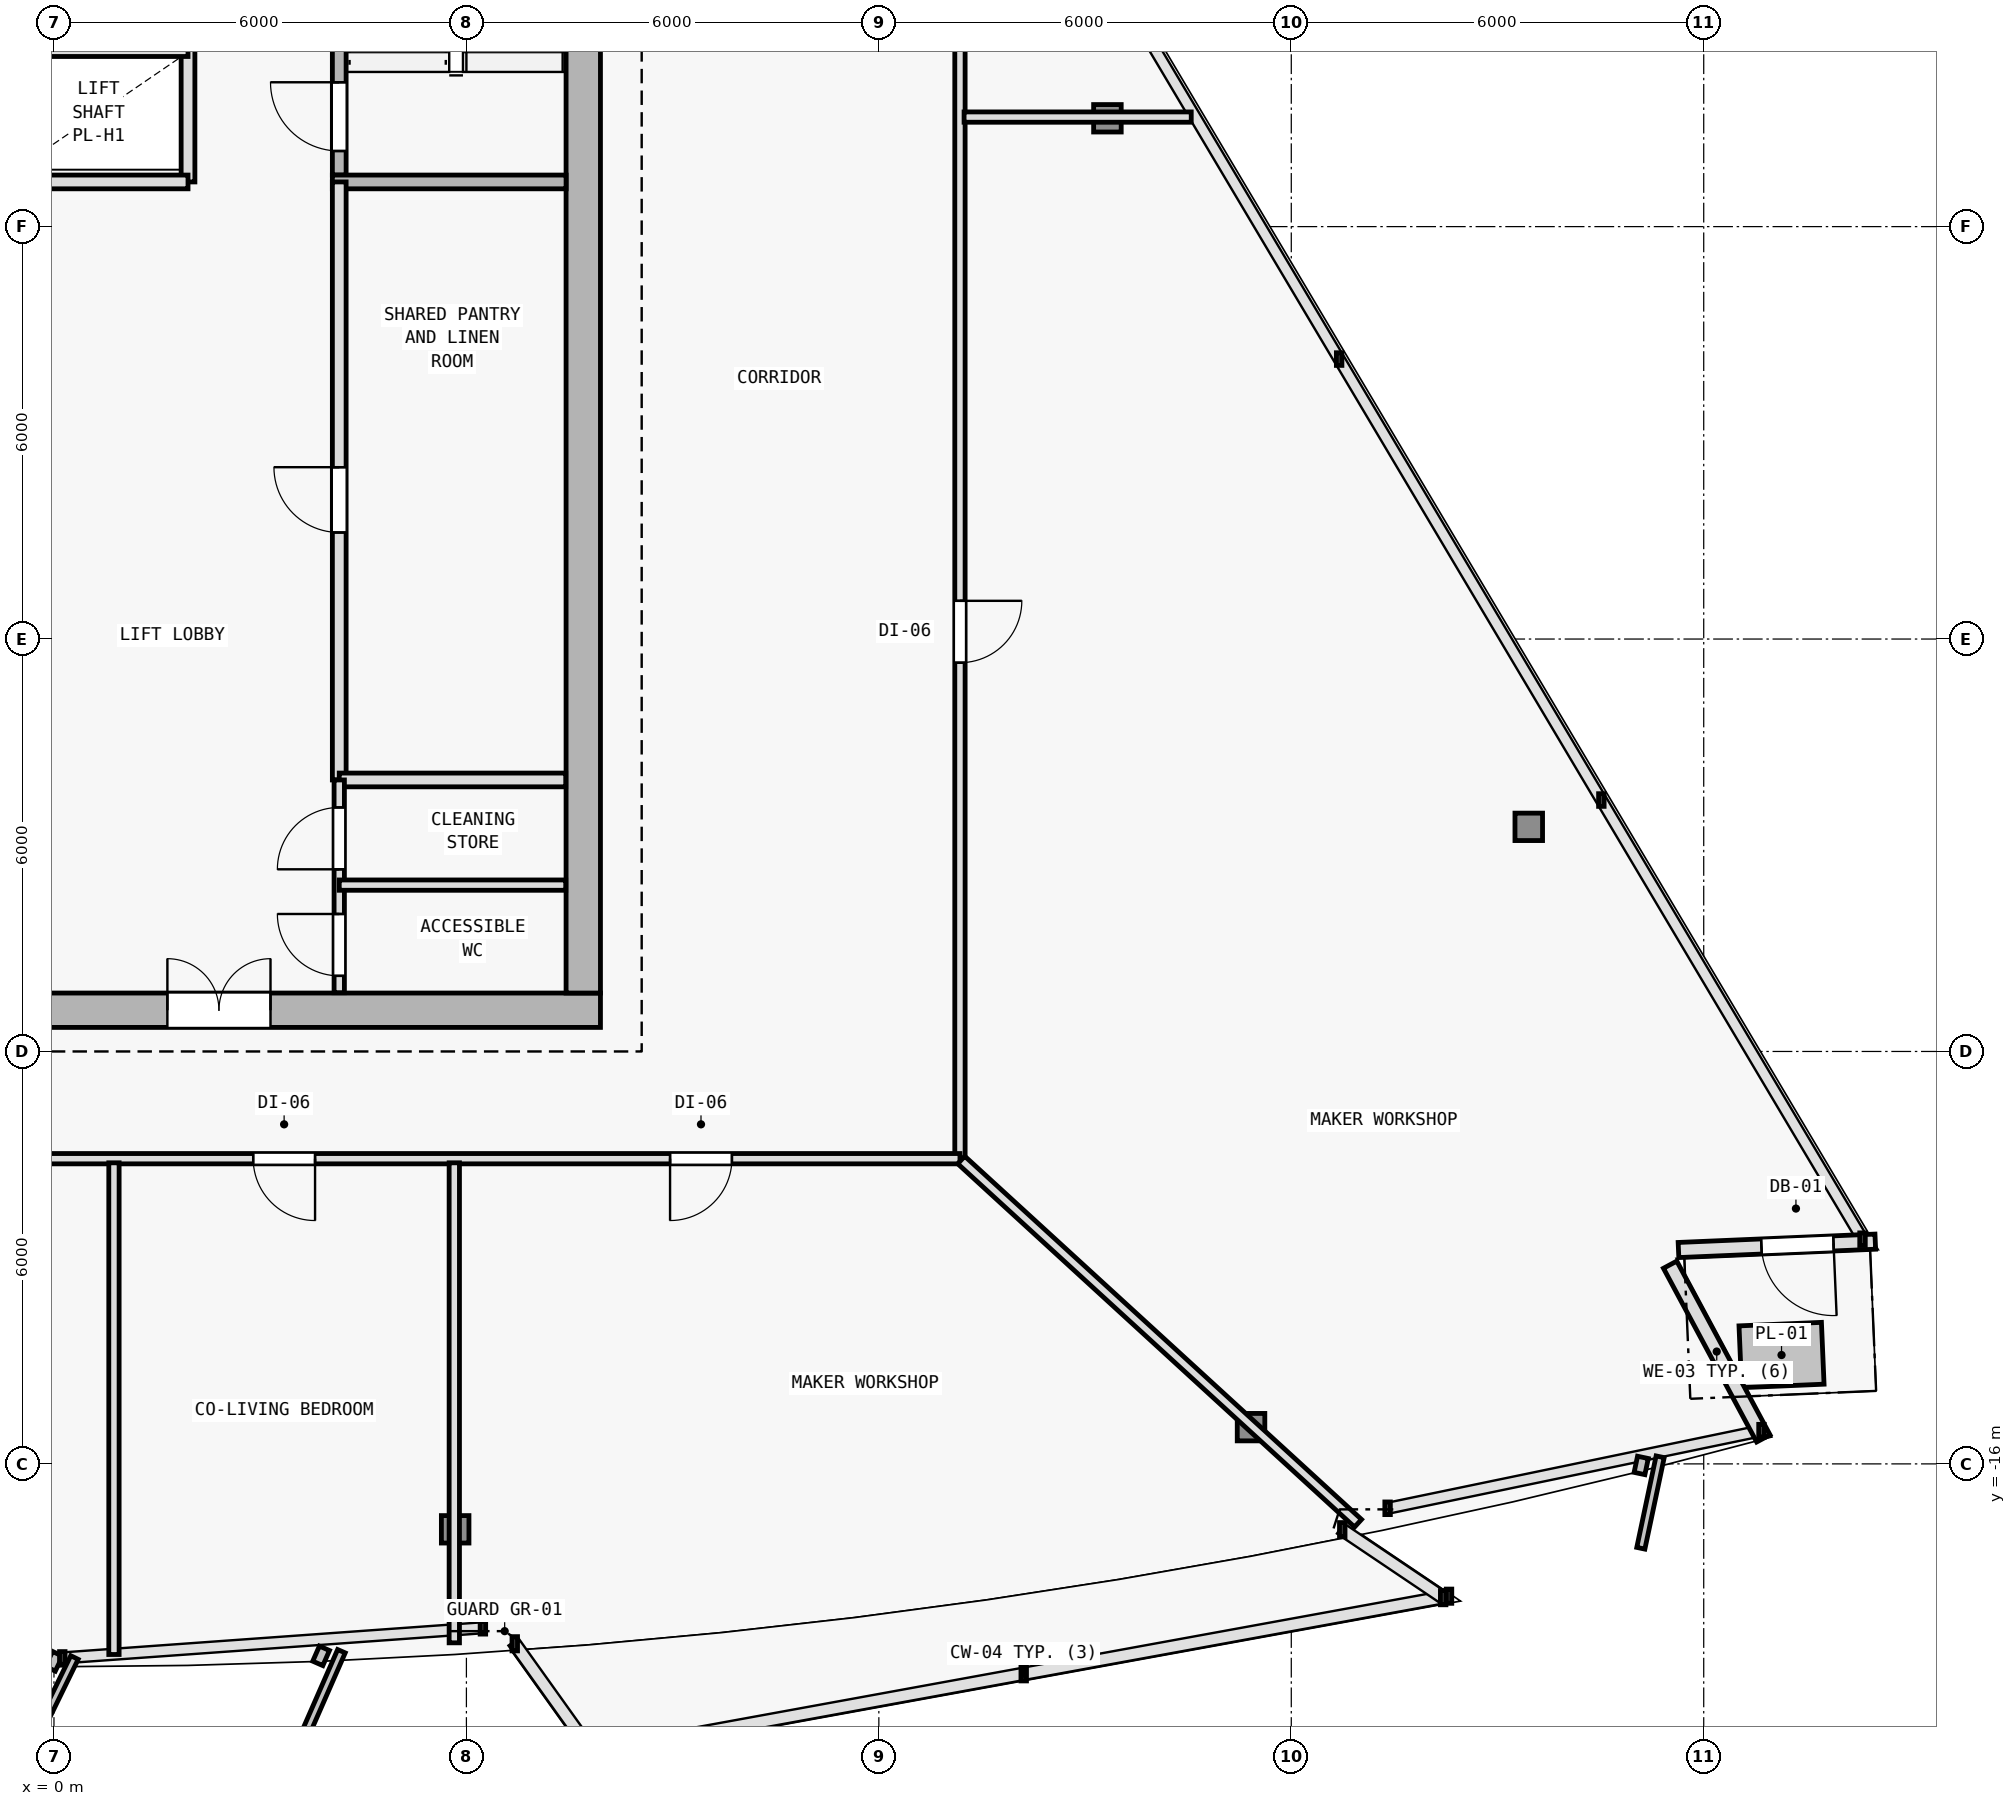
"""IFC4 building model, lengths in metres.
Left out: names, types, materials, properties, quantities, classifications, styles, units other than length and angle.
Written with IfcOpenShell. Run it as: python <this file> out.ifc"""

import sys

from ifc_helpers import new_model, si_unit, direction, frame, frame_2d, origin, origin_2d, place, context, subcontext, project, spatial, rectangle, i_section, extrude, element, fill, save


model = new_model("IFC4")
c1 = context("Model", 3, precision=1e-05, world=origin(), true_north=direction((0.0, 1.0)))
c2 = subcontext(c1, "Body", "Model", "MODEL_VIEW")
j1 = project(units=[si_unit("LENGTHUNIT", "METRE"), si_unit("PLANEANGLEUNIT", "RADIAN")], contexts=[c1])
p1 = place(None, origin())
s1 = spatial("IfcSite", under=j1, at=p1, CompositionType="ELEMENT")
p2 = place(p1, origin())
s2 = spatial("IfcBuilding", under=s1, at=p2, CompositionType="ELEMENT")
p3 = place(p2, frame((0.0, 0.0, 174.6)))
s3 = spatial("IfcBuildingStorey", under=s2, at=p3, CompositionType="ELEMENT", Elevation=174.6)
for number, where, z_axis, x_axis in (
    (1, (7.7, -9.4, 0.0), (0.0, 0.0, 1.0), (1.0, 0.0, 0.0)),
    (2, (0.0, -9.4, 0.0), (0.0, 0.0, 1.0), (1.0, 0.0, 0.0)),
    (3, (7.7, 0.4, 0.0), (0.0, 0.0, 1.0), (1.0, 0.0, 0.0)),
):
    element("IfcColumn", number, at=place(p3, frame(where, z_axis=z_axis, x_axis=x_axis)), inside=s3, PredefinedType="COLUMN", context=c2, shape_type="SweptSolid", body=[
        extrude(i_section(OverallWidth=0.404, OverallDepth=0.407, WebThickness=0.017, FlangeThickness=0.028, FilletRadius=0.015, at=origin_2d()), origin(), (0.0, 0.0, 1.0), 3.6),
    ])
p4 = place(p3, frame((5.836, -16.952, 0.005), z_axis=(-0.007069526978, 0.036231325765, 0.999318424138), x_axis=(-0.981490592026, -0.19151035942, 0.0)))
e4 = element("IfcColumn", 4, at=p4, inside=s3, PredefinedType="COLUMN", context=c2, shape_type="SweptSolid", body=[
    extrude(i_section(OverallWidth=0.401, OverallDepth=0.399, WebThickness=0.016, FlangeThickness=0.025, FilletRadius=0.015, at=origin_2d()), origin(), (0.0, 0.0, 1.0), 3.592),
])
p5 = place(p3, frame((17.415, -15.465, 0.005), z_axis=(-0.021205716244, 0.034391321857, 0.999183443908), x_axis=(-0.851195920716, -0.524848077596, 0.0)))
e5 = element("IfcColumn", 5, at=p5, inside=s3, PredefinedType="COLUMN", context=c2, shape_type="SweptSolid", body=[
    extrude(i_section(OverallWidth=0.401, OverallDepth=0.399, WebThickness=0.016, FlangeThickness=0.025, FilletRadius=0.015, at=origin_2d()), origin(), (0.0, 0.0, 1.0), 3.592),
])
p6 = place(p3, frame((21.455, -6.732, 0.005), z_axis=(-0.026784657173, 0.022229905827, 0.99939402311), x_axis=(-0.638646294968, -0.7695004288, 0.0)))
e6 = element("IfcColumn", 6, at=p6, inside=s3, PredefinedType="COLUMN", context=c2, shape_type="SweptSolid", body=[
    extrude(i_section(OverallWidth=0.401, OverallDepth=0.399, WebThickness=0.016, FlangeThickness=0.025, FilletRadius=0.015, at=origin_2d()), origin(), (0.0, 0.0, 1.0), 3.591),
])
p7 = place(p3, frame((15.325, 3.576, 0.005), z_axis=(-0.019449845701, 0.009792929304, 0.999762872904), x_axis=(-0.449710241045, -0.893174506521, 0.0)))
e7 = element("IfcColumn", 7, at=p7, inside=s3, PredefinedType="COLUMN", context=c2, shape_type="SweptSolid", body=[
    extrude(i_section(OverallWidth=0.401, OverallDepth=0.399, WebThickness=0.016, FlangeThickness=0.025, FilletRadius=0.015, at=origin_2d()), origin(), (0.0, 0.0, 1.0), 3.59),
])
p8 = place(p3, frame((23.511, -13.102, 0.0), z_axis=(0.0, 0.0, 1.0), x_axis=(0.472804807667, -0.881167188362, 0.0)))
e8 = element("IfcWall", 8, at=p8, inside=s3, PredefinedType="SOLIDWALL", context=c2, shape_type="SweptSolid", body=[
    extrude(rectangle(XDim=2.868, YDim=0.22, at=frame_2d((1.434, 0.0))), origin(), (0.0, 0.0, 1.0), 3.35),
])
p9 = place(p3, frame((26.496, -12.767, 0.0), z_axis=(0.0, 0.0, 1.0), x_axis=(-0.999095763679, -0.042516526188, 0.0)))
e9 = element("IfcWall", 9, at=p9, inside=s3, PredefinedType="SOLIDWALL", context=c2, shape_type="SweptSolid", body=[
    extrude(rectangle(XDim=2.865, YDim=0.22, at=frame_2d((1.433, 0.0))), origin(), (0.0, 0.0, 1.0), 3.35),
])
p10 = place(p9, frame((0.608, 0.0, 0.0)))
e10 = element("IfcOpeningElement", 10, at=p10, cuts=e9, PredefinedType="OPENING", context=c2, shape_type="SweptSolid", body=[
    extrude(rectangle(XDim=1.05, YDim=2.15, at=frame_2d((0.525, 1.075))), frame((0.0, 0.12, 0.0), z_axis=(0.0, -1.0, 0.0), x_axis=(1.0, 0.0, 0.0)), (0.0, 0.0, 1.0), 0.24),
])
p11 = place(p3, frame((-7.95, -9.4, 0.0), z_axis=(0.0, 0.0, 1.0), x_axis=(1.0, 0.0, 0.0)))
e11 = element("IfcWall", 11, at=p11, inside=s3, PredefinedType="SHEAR", context=c2, shape_type="SweptSolid", body=[
    extrude(rectangle(XDim=15.9, YDim=0.5, at=frame_2d((7.95, 0.0))), origin(), (0.0, 0.0, 1.0), 3.35),
])
p12 = place(p11, frame((9.6, 0.0, 0.0)))
e12 = element("IfcOpeningElement", 12, at=p12, cuts=e11, PredefinedType="OPENING", context=c2, shape_type="SweptSolid", body=[
    extrude(rectangle(XDim=1.5, YDim=2.2, at=frame_2d((0.75, 1.1))), frame((0.0, 0.26, 0.0), z_axis=(0.0, -1.0, 0.0), x_axis=(1.0, 0.0, 0.0)), (0.0, 0.0, 1.0), 0.52),
])
p13 = place(p3, frame((7.7, 9.95, 0.0), z_axis=(0.0, 0.0, 1.0), x_axis=(0.0, -1.0, 0.0)))
e13 = element("IfcWall", 13, at=p13, inside=s3, PredefinedType="SHEAR", context=c2, shape_type="SweptSolid", body=[
    extrude(rectangle(XDim=19.1, YDim=0.5, at=frame_2d((9.55, 0.0))), origin(), (0.0, 0.0, 1.0), 3.35),
])
p14 = place(p3, frame((4.15, 2.75, 0.0), z_axis=(0.0, 0.0, 1.0), x_axis=(0.0, 1.0, 0.0)))
e14 = element("IfcWall", 14, at=p14, inside=s3, PredefinedType="SOLIDWALL", context=c2, shape_type="SweptSolid", body=[
    extrude(rectangle(XDim=7.2, YDim=0.2, at=frame_2d((3.6, 0.0))), origin(), (0.0, 0.0, 1.0), 3.35),
])
p15 = place(p14, frame((0.35, 0.0, 0.0)))
e15 = element("IfcOpeningElement", 15, at=p15, cuts=e14, PredefinedType="OPENING", context=c2, shape_type="SweptSolid", body=[
    extrude(rectangle(XDim=1.0, YDim=2.15, at=frame_2d((0.5, 1.075))), frame((0.0, 0.11, 0.0), z_axis=(0.0, -1.0, 0.0), x_axis=(1.0, 0.0, 0.0)), (0.0, 0.0, 1.0), 0.22),
])
p16 = place(p3, frame((4.05, 2.65, 0.0), z_axis=(0.0, 0.0, 1.0), x_axis=(1.0, 0.0, 0.0)))
e16 = element("IfcWall", 16, at=p16, inside=s3, PredefinedType="SOLIDWALL", context=c2, shape_type="SweptSolid", body=[
    extrude(rectangle(XDim=3.4, YDim=0.2, at=frame_2d((1.7, 0.0))), origin(), (0.0, 0.0, 1.0), 3.35),
])
p17 = place(p3, frame((4.15, -6.05, 0.0), z_axis=(0.0, 0.0, 1.0), x_axis=(0.0, 1.0, 0.0)))
e17 = element("IfcWall", 17, at=p17, inside=s3, PredefinedType="SOLIDWALL", context=c2, shape_type="SweptSolid", body=[
    extrude(rectangle(XDim=8.7, YDim=0.2, at=frame_2d((4.35, 0.0))), origin(), (0.0, 0.0, 1.0), 3.35),
])
p18 = place(p17, frame((3.6, 0.0, 0.0)))
e18 = element("IfcOpeningElement", 18, at=p18, cuts=e17, PredefinedType="OPENING", context=c2, shape_type="SweptSolid", body=[
    extrude(rectangle(XDim=0.95, YDim=2.1, at=frame_2d((0.475, 1.05))), frame((0.0, 0.11, 0.0), z_axis=(0.0, -1.0, 0.0), x_axis=(1.0, 0.0, 0.0)), (0.0, 0.0, 1.0), 0.22),
])
p19 = place(p3, frame((1.95, 2.65, 0.0), z_axis=(0.0, 0.0, 1.0), x_axis=(0.0, 1.0, 0.0)))
e19 = element("IfcWall", 19, at=p19, inside=s3, PredefinedType="SOLIDWALL", context=c2, shape_type="SweptSolid", body=[
    extrude(rectangle(XDim=7.295, YDim=0.2, at=frame_2d((3.647, 0.0))), origin(), (0.0, 0.0, 1.0), 3.35),
])
p20 = place(p3, frame((-0.95, 2.65, 0.0), z_axis=(0.0, 0.0, 1.0), x_axis=(1.0, 0.0, 0.0)))
e20 = element("IfcWall", 20, at=p20, inside=s3, PredefinedType="SOLIDWALL", context=c2, shape_type="SweptSolid", body=[
    extrude(rectangle(XDim=2.9, YDim=0.2, at=frame_2d((1.45, 0.0))), origin(), (0.0, 0.0, 1.0), 3.35),
])
p21 = place(p3, frame((-0.75, 4.55, 0.0), z_axis=(0.0, 0.0, 1.0), x_axis=(1.0, 0.0, 0.0)))
e21 = element("IfcWall", 21, at=p21, inside=s3, PredefinedType="PARTITIONING", context=c2, shape_type="SweptSolid", body=[
    extrude(rectangle(XDim=2.7, YDim=0.15, at=frame_2d((1.35, 0.0))), origin(), (0.0, 0.0, 1.0), 3.35),
])
p22 = place(p3, frame((4.15, -6.05, 0.0), z_axis=(0.0, 0.0, 1.0), x_axis=(1.0, 0.0, 0.0)))
e22 = element("IfcWall", 22, at=p22, inside=s3, PredefinedType="SOLIDWALL", context=c2, shape_type="SweptSolid", body=[
    extrude(rectangle(XDim=3.295, YDim=0.2, at=frame_2d((1.647, 0.0))), origin(), (0.0, 0.0, 1.0), 3.35),
])
p23 = place(p3, frame((4.15, -9.145, 0.0), z_axis=(0.0, 0.0, 1.0), x_axis=(0.0, 1.0, 0.0)))
e23 = element("IfcWall", 23, at=p23, inside=s3, PredefinedType="PARTITIONING", context=c2, shape_type="SweptSolid", body=[
    extrude(rectangle(XDim=3.095, YDim=0.15, at=frame_2d((1.547, 0.0))), origin(), (0.0, 0.0, 1.0), 3.35),
])
p24 = place(p23, frame((0.245, 0.0, 0.0)))
e24 = element("IfcOpeningElement", 24, at=p24, cuts=e23, PredefinedType="OPENING", context=c2, shape_type="SweptSolid", body=[
    extrude(rectangle(XDim=0.9, YDim=2.1, at=frame_2d((0.45, 1.05))), frame((0.0, 0.085, 0.0), z_axis=(0.0, -1.0, 0.0), x_axis=(1.0, 0.0, 0.0)), (0.0, 0.0, 1.0), 0.17),
])
p25 = place(p23, frame((1.795, 0.0, 0.0)))
e25 = element("IfcOpeningElement", 25, at=p25, cuts=e23, PredefinedType="OPENING", context=c2, shape_type="SweptSolid", body=[
    extrude(rectangle(XDim=0.9, YDim=2.1, at=frame_2d((0.45, 1.05))), frame((0.0, 0.085, 0.0), z_axis=(0.0, -1.0, 0.0), x_axis=(1.0, 0.0, 0.0)), (0.0, 0.0, 1.0), 0.17),
])
p26 = place(p3, frame((4.15, -7.58, 0.0), z_axis=(0.0, 0.0, 1.0), x_axis=(1.0, 0.0, 0.0)))
e26 = element("IfcWall", 26, at=p26, inside=s3, PredefinedType="PARTITIONING", context=c2, shape_type="SweptSolid", body=[
    extrude(rectangle(XDim=3.295, YDim=0.15, at=frame_2d((1.647, 0.0))), origin(), (0.0, 0.0, 1.0), 3.35),
])
p27 = place(p3, frame((13.18, 8.444, 0.0), z_axis=(0.0, 0.0, 1.0), x_axis=(0.0, -1.0, 0.0)))
e27 = element("IfcWall", 27, at=p27, inside=s3, PredefinedType="PARTITIONING", context=c2, shape_type="SweptSolid", body=[
    extrude(rectangle(XDim=20.004, YDim=0.15, at=frame_2d((10.002, 0.0))), origin(), (0.0, 0.0, 1.0), 2.825),
])
p28 = place(p27, frame((11.888, 0.0, 0.0)))
e28 = element("IfcOpeningElement", 28, at=p28, cuts=e27, PredefinedType="OPENING", context=c2, shape_type="SweptSolid", body=[
    extrude(rectangle(XDim=0.9, YDim=2.1, at=frame_2d((0.45, 1.05))), frame((0.0, 0.085, 0.0), z_axis=(0.0, -1.0, 0.0), x_axis=(1.0, 0.0, 0.0)), (0.0, 0.0, 1.0), 0.17),
])
p29 = place(p3, frame((13.18, -11.56, 0.0), z_axis=(0.0, 0.0, 1.0), x_axis=(-1.0, 0.0, 0.0)))
e29 = element("IfcWall", 29, at=p29, inside=s3, PredefinedType="PARTITIONING", context=c2, shape_type="SweptSolid", body=[
    extrude(rectangle(XDim=23.04, YDim=0.15, at=frame_2d((11.52, 0.0))), origin(), (0.0, 0.0, 1.0), 2.825),
])
p30 = place(p29, frame((19.61, 0.0, 0.0)))
e30 = element("IfcOpeningElement", 30, at=p30, cuts=e29, PredefinedType="OPENING", context=c2, shape_type="SweptSolid", body=[
    extrude(rectangle(XDim=0.9, YDim=2.1, at=frame_2d((0.45, 1.05))), frame((0.0, 0.085, 0.0), z_axis=(0.0, -1.0, 0.0), x_axis=(1.0, 0.0, 0.0)), (0.0, 0.0, 1.0), 0.17),
])
p31 = place(p29, frame((14.333, 0.0, 0.0)))
e31 = element("IfcOpeningElement", 31, at=p31, cuts=e29, PredefinedType="OPENING", context=c2, shape_type="SweptSolid", body=[
    extrude(rectangle(XDim=0.9, YDim=2.1, at=frame_2d((0.45, 1.05))), frame((0.0, 0.085, 0.0), z_axis=(0.0, -1.0, 0.0), x_axis=(1.0, 0.0, 0.0)), (0.0, 0.0, 1.0), 0.17),
])
p32 = place(p29, frame((9.382, 0.0, 0.0)))
e32 = element("IfcOpeningElement", 32, at=p32, cuts=e29, PredefinedType="OPENING", context=c2, shape_type="SweptSolid", body=[
    extrude(rectangle(XDim=0.9, YDim=2.1, at=frame_2d((0.45, 1.05))), frame((0.0, 0.085, 0.0), z_axis=(0.0, -1.0, 0.0), x_axis=(1.0, 0.0, 0.0)), (0.0, 0.0, 1.0), 0.17),
])
p33 = place(p29, frame((3.317, 0.0, 0.0)))
e33 = element("IfcOpeningElement", 33, at=p33, cuts=e29, PredefinedType="OPENING", context=c2, shape_type="SweptSolid", body=[
    extrude(rectangle(XDim=0.9, YDim=2.1, at=frame_2d((0.45, 1.05))), frame((0.0, 0.085, 0.0), z_axis=(0.0, -1.0, 0.0), x_axis=(1.0, 0.0, 0.0)), (0.0, 0.0, 1.0), 0.17),
])
p34 = place(p3, frame((5.824, -11.62, 0.0), z_axis=(0.0, 0.0, 1.0), x_axis=(0.0, -1.0, 0.0)))
e34 = element("IfcWall", 34, at=p34, inside=s3, PredefinedType="PARTITIONING", context=c2, shape_type="SweptSolid", body=[
    extrude(rectangle(XDim=6.983, YDim=0.15, at=frame_2d((3.491, 0.0))), origin(), (0.0, 0.0, 1.0), 2.935),
])
p35 = place(p3, frame((13.199, -11.579, 0.0), z_axis=(0.0, 0.0, 1.0), x_axis=(0.737583898857, -0.675255501382, 0.0)))
e35 = element("IfcWall", 35, at=p35, inside=s3, PredefinedType="PARTITIONING", context=c2, shape_type="SweptSolid", body=[
    extrude(rectangle(XDim=7.826, YDim=0.15, at=frame_2d((3.913, 0.0))), origin(), (0.0, 0.0, 1.0), 2.825),
])
p36 = place(p3, frame((13.24, 3.594, 0.0), z_axis=(0.0, 0.0, 1.0), x_axis=(1.0, 0.0, 0.0)))
e36 = element("IfcWall", 36, at=p36, inside=s3, PredefinedType="PARTITIONING", context=c2, shape_type="SweptSolid", body=[
    extrude(rectangle(XDim=3.305, YDim=0.15, at=frame_2d((1.652, 0.0))), origin(), (0.0, 0.0, 1.0), 2.935),
])
p37 = place(p3, frame((0.873, -11.62, 0.0), z_axis=(0.0, 0.0, 1.0), x_axis=(0.0, -1.0, 0.0)))
e37 = element("IfcWall", 37, at=p37, inside=s3, PredefinedType="PARTITIONING", context=c2, shape_type="SweptSolid", body=[
    extrude(rectangle(XDim=7.153, YDim=0.15, at=frame_2d((3.577, 0.0))), origin(), (0.0, 0.0, 1.0), 2.925),
])
p38 = place(p10, origin())
e38 = element("IfcDoor", 38, at=p38, inside=s3, OperationType="SINGLE_SWING_LEFT", PredefinedType="DOOR", context=c2, shape_type="SweptSolid", body=[
    extrude(rectangle(XDim=1.05, YDim=2.15, at=frame_2d((0.525, 1.075))), frame((0.0, 0.025, 0.0), z_axis=(0.0, -1.0, 0.0), x_axis=(1.0, 0.0, 0.0)), (0.0, 0.0, 1.0), 0.05),
])
fill(e10, e38)
p39 = place(p12, origin())
e39 = element("IfcDoor", 39, at=p39, inside=s3, OperationType="DOUBLE_DOOR_SINGLE_SWING", PredefinedType="DOOR", context=c2, shape_type="SweptSolid", body=[
    extrude(rectangle(XDim=1.5, YDim=2.2, at=frame_2d((0.75, 1.1))), frame((0.0, 0.025, 0.0), z_axis=(0.0, -1.0, 0.0), x_axis=(1.0, 0.0, 0.0)), (0.0, 0.0, 1.0), 0.05),
])
fill(e12, e39)
p40 = place(p15, origin())
e40 = element("IfcDoor", 40, at=p40, inside=s3, OperationType="SINGLE_SWING_RIGHT", PredefinedType="DOOR", context=c2, shape_type="SweptSolid", body=[
    extrude(rectangle(XDim=1.0, YDim=2.15, at=frame_2d((0.5, 1.075))), frame((0.0, 0.025, 0.0), z_axis=(0.0, -1.0, 0.0), x_axis=(1.0, 0.0, 0.0)), (0.0, 0.0, 1.0), 0.05),
])
fill(e15, e40)
p41 = place(p18, origin())
e41 = element("IfcDoor", 41, at=p41, inside=s3, OperationType="SINGLE_SWING_RIGHT", PredefinedType="DOOR", context=c2, shape_type="SweptSolid", body=[
    extrude(rectangle(XDim=0.95, YDim=2.1, at=frame_2d((0.475, 1.05))), frame((0.0, 0.025, 0.0), z_axis=(0.0, -1.0, 0.0), x_axis=(1.0, 0.0, 0.0)), (0.0, 0.0, 1.0), 0.05),
])
fill(e18, e41)
p42 = place(p24, origin())
e42 = element("IfcDoor", 42, at=p42, inside=s3, OperationType="SINGLE_SWING_RIGHT", PredefinedType="DOOR", context=c2, shape_type="SweptSolid", body=[
    extrude(rectangle(XDim=0.9, YDim=2.1, at=frame_2d((0.45, 1.05))), frame((0.0, 0.025, 0.0), z_axis=(0.0, -1.0, 0.0), x_axis=(1.0, 0.0, 0.0)), (0.0, 0.0, 1.0), 0.05),
])
fill(e24, e42)
p43 = place(p25, origin())
e43 = element("IfcDoor", 43, at=p43, inside=s3, OperationType="SINGLE_SWING_LEFT", PredefinedType="DOOR", context=c2, shape_type="SweptSolid", body=[
    extrude(rectangle(XDim=0.9, YDim=2.1, at=frame_2d((0.45, 1.05))), frame((0.0, 0.025, 0.0), z_axis=(0.0, -1.0, 0.0), x_axis=(1.0, 0.0, 0.0)), (0.0, 0.0, 1.0), 0.05),
])
fill(e25, e43)
p44 = place(p32, origin())
e44 = element("IfcDoor", 44, at=p44, inside=s3, OperationType="SINGLE_SWING_LEFT", PredefinedType="DOOR", context=c2, shape_type="SweptSolid", body=[
    extrude(rectangle(XDim=0.9, YDim=2.1, at=frame_2d((0.45, 1.05))), frame((0.0, 0.025, 0.0), z_axis=(0.0, -1.0, 0.0), x_axis=(1.0, 0.0, 0.0)), (0.0, 0.0, 1.0), 0.05),
])
fill(e32, e44)
p45 = place(p33, origin())
e45 = element("IfcDoor", 45, at=p45, inside=s3, OperationType="SINGLE_SWING_RIGHT", PredefinedType="DOOR", context=c2, shape_type="SweptSolid", body=[
    extrude(rectangle(XDim=0.9, YDim=2.1, at=frame_2d((0.45, 1.05))), frame((0.0, 0.025, 0.0), z_axis=(0.0, -1.0, 0.0), x_axis=(1.0, 0.0, 0.0)), (0.0, 0.0, 1.0), 0.05),
])
fill(e33, e45)
p46 = place(p28, origin())
e46 = element("IfcDoor", 46, at=p46, inside=s3, OperationType="SINGLE_SWING_LEFT", PredefinedType="DOOR", context=c2, shape_type="SweptSolid", body=[
    extrude(rectangle(XDim=0.9, YDim=2.1, at=frame_2d((0.45, 1.05))), frame((0.0, 0.025, 0.0), z_axis=(0.0, -1.0, 0.0), x_axis=(1.0, 0.0, 0.0)), (0.0, 0.0, 1.0), 0.05),
])
fill(e28, e46)
save(model, sys.argv[1])
